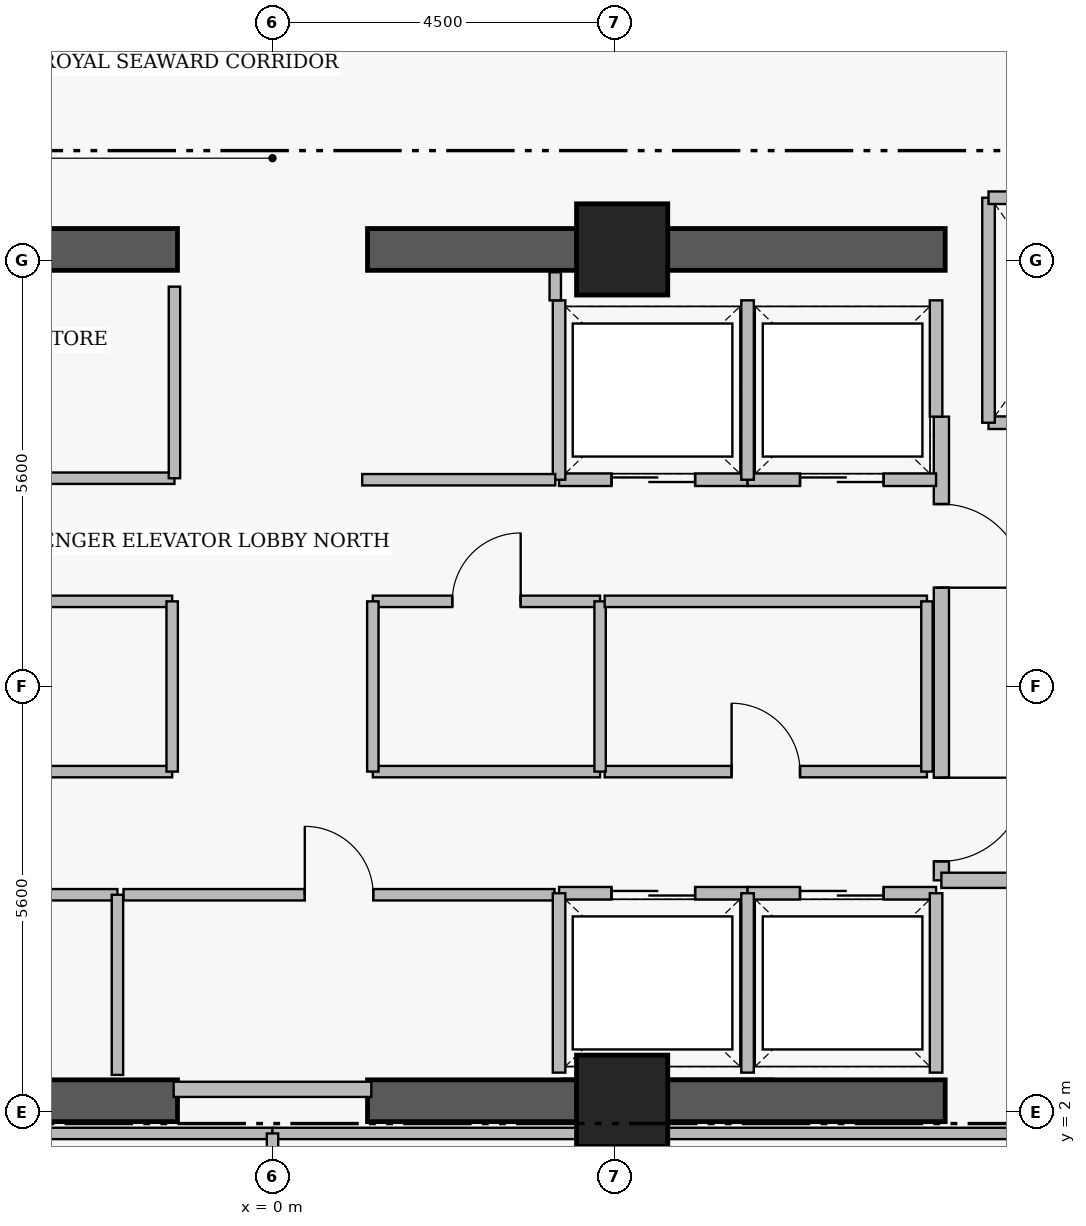
"""IFC4 building model, lengths in metres.
Left out: names, types, materials, properties, quantities, classifications, styles, units other than length and angle.
Written with IfcOpenShell. Run it as: python <this file> out.ifc"""

import sys

from ifc_helpers import new_model, si_unit, direction, frame, frame_2d, origin, origin_2d, place, context, subcontext, project, spatial, rectangle, extrude, element, fill, save


model = new_model("IFC4")
c1 = context("Model", 3, precision=1e-05, world=origin(), true_north=direction((0.0, 1.0)))
c2 = subcontext(c1, "Body", "Model", "MODEL_VIEW")
j1 = project(units=[si_unit("LENGTHUNIT", "METRE"), si_unit("PLANEANGLEUNIT", "RADIAN")], contexts=[c1])
p1 = place(None, origin())
s1 = spatial("IfcSite", under=j1, at=p1, CompositionType="ELEMENT")
p2 = place(p1, origin())
s2 = spatial("IfcBuilding", under=s1, at=p2, CompositionType="ELEMENT")
p3 = place(p2, frame((0.0, 0.0, 261.85)))
s3 = spatial("IfcBuildingStorey", under=s2, at=p3, CompositionType="ELEMENT", Elevation=261.85)
for number, where, z_axis, x_axis in (
    (1, (-8.85, 2.15, 0.0), (0.0, 0.0, 1.0), (1.0, 0.0, 0.0)),
    (2, (1.25, 2.15, 0.0), (0.0, 0.0, 1.0), (1.0, 0.0, 0.0)),
    (3, (-8.85, 13.35, 0.0), (0.0, 0.0, 1.0), (1.0, 0.0, 0.0)),
    (4, (1.25, 13.35, 0.0), (0.0, 0.0, 1.0), (1.0, 0.0, 0.0)),
):
    element("IfcWall", number, at=place(p3, frame(where, z_axis=z_axis, x_axis=x_axis)), inside=s3, PredefinedType="SHEAR", context=c2, shape_type="SweptSolid", body=[
        extrude(rectangle(XDim=7.6, YDim=0.55, at=frame_2d((3.8, 0.0))), origin(), (0.0, 0.0, 1.0), 3.48),
    ])
for number, where, z_axis, x_axis in (
    (5, (4.6, 13.35, 0.0), (0.0, 0.0, 1.0), (1.0, 0.0, 0.0)),
    (6, (4.6, 2.15, 0.0), (0.0, 0.0, 1.0), (1.0, 0.0, 0.0)),
):
    element("IfcColumn", number, at=place(p3, frame(where, z_axis=z_axis, x_axis=x_axis)), inside=s3, PredefinedType="COLUMN", context=c2, shape_type="SweptSolid", body=[
        extrude(rectangle(XDim=1.2, YDim=1.2, at=origin_2d()), origin(), (0.0, 0.0, 1.0), 3.7),
    ])
p4 = place(p3, frame((8.8, 11.15, 0.0), z_axis=(0.0, 0.0, 1.0), x_axis=(0.0, -1.0, 0.0)))
e7 = element("IfcWall", 7, at=p4, inside=s3, PredefinedType="PARTITIONING", context=c2, shape_type="SweptSolid", body=[
    extrude(rectangle(XDim=6.1, YDim=0.2, at=frame_2d((3.05, 0.0))), origin(), (0.0, 0.0, 1.0), 3.48),
])
p5 = place(p4, frame((1.15, 0.0, 0.0)))
e8 = element("IfcOpeningElement", 8, at=p5, cuts=e7, PredefinedType="OPENING", context=c2, shape_type="SweptSolid", body=[
    extrude(rectangle(XDim=1.1, YDim=2.2, at=frame_2d((0.55, 1.1))), frame((0.0, 0.11, 0.0), z_axis=(0.0, -1.0, 0.0), x_axis=(1.0, 0.0, 0.0)), (0.0, 0.0, 1.0), 0.22),
])
p6 = place(p4, frame((4.75, 0.0, 0.0)))
e9 = element("IfcOpeningElement", 9, at=p6, cuts=e7, PredefinedType="OPENING", context=c2, shape_type="SweptSolid", body=[
    extrude(rectangle(XDim=1.1, YDim=2.2, at=frame_2d((0.55, 1.1))), frame((0.0, 0.11, 0.0), z_axis=(0.0, -1.0, 0.0), x_axis=(1.0, 0.0, 0.0)), (0.0, 0.0, 1.0), 0.22),
])
p7 = place(p3, frame((9.42, 11.07, 0.0), z_axis=(0.0, 0.0, 1.0), x_axis=(1.0, 0.0, 0.0)))
e10 = element("IfcWall", 10, at=p7, inside=s3, PredefinedType="PARTITIONING", context=c2, shape_type="SweptSolid", body=[
    extrude(rectangle(XDim=2.16, YDim=0.165, at=frame_2d((1.08, 0.0))), origin(), (0.0, 0.0, 1.0), 3.48),
])
p8 = place(p7, frame((0.53, 0.0, 0.0)))
e11 = element("IfcOpeningElement", 11, at=p8, cuts=e10, PredefinedType="OPENING", context=c2, shape_type="SweptSolid", body=[
    extrude(rectangle(XDim=1.15, YDim=2.25, at=frame_2d((0.575, 1.125))), frame((0.0, 0.093, 0.0), z_axis=(0.0, -1.0, 0.0), x_axis=(1.0, 0.0, 0.0)), (0.0, 0.0, 1.0), 0.185),
])
p9 = place(p3, frame((3.77, 4.88, 0.0), z_axis=(0.0, 0.0, 1.0), x_axis=(1.0, 0.0, 0.0)))
e12 = element("IfcWall", 12, at=p9, inside=s3, PredefinedType="PARTITIONING", context=c2, shape_type="SweptSolid", body=[
    extrude(rectangle(XDim=2.48, YDim=0.165, at=frame_2d((1.24, 0.0))), origin(), (0.0, 0.0, 1.0), 3.48),
])
p10 = place(p9, frame((0.69, 0.0, 0.0)))
e13 = element("IfcOpeningElement", 13, at=p10, cuts=e12, PredefinedType="OPENING", context=c2, shape_type="SweptSolid", body=[
    extrude(rectangle(XDim=1.1, YDim=2.25, at=frame_2d((0.55, 1.125))), frame((0.0, 0.093, 0.0), z_axis=(0.0, -1.0, 0.0), x_axis=(1.0, 0.0, 0.0)), (0.0, 0.0, 1.0), 0.185),
])
p11 = place(p3, frame((6.25, 4.88, 0.0), z_axis=(0.0, 0.0, 1.0), x_axis=(1.0, 0.0, 0.0)))
e14 = element("IfcWall", 14, at=p11, inside=s3, PredefinedType="PARTITIONING", context=c2, shape_type="SweptSolid", body=[
    extrude(rectangle(XDim=2.48, YDim=0.165, at=frame_2d((1.24, 0.0))), origin(), (0.0, 0.0, 1.0), 3.48),
])
p12 = place(p11, frame((0.69, 0.0, 0.0)))
e15 = element("IfcOpeningElement", 15, at=p12, cuts=e14, PredefinedType="OPENING", context=c2, shape_type="SweptSolid", body=[
    extrude(rectangle(XDim=1.1, YDim=2.25, at=frame_2d((0.55, 1.125))), frame((0.0, 0.093, 0.0), z_axis=(0.0, -1.0, 0.0), x_axis=(1.0, 0.0, 0.0)), (0.0, 0.0, 1.0), 0.185),
])
p13 = place(p3, frame((3.77, 10.32, 0.0), z_axis=(0.0, 0.0, 1.0), x_axis=(1.0, 0.0, 0.0)))
e16 = element("IfcWall", 16, at=p13, inside=s3, PredefinedType="PARTITIONING", context=c2, shape_type="SweptSolid", body=[
    extrude(rectangle(XDim=2.48, YDim=0.165, at=frame_2d((1.24, 0.0))), origin(), (0.0, 0.0, 1.0), 3.48),
])
p14 = place(p13, frame((0.69, 0.0, 0.0)))
e17 = element("IfcOpeningElement", 17, at=p14, cuts=e16, PredefinedType="OPENING", context=c2, shape_type="SweptSolid", body=[
    extrude(rectangle(XDim=1.1, YDim=2.25, at=frame_2d((0.55, 1.125))), frame((0.0, 0.093, 0.0), z_axis=(0.0, -1.0, 0.0), x_axis=(1.0, 0.0, 0.0)), (0.0, 0.0, 1.0), 0.185),
])
p15 = place(p3, frame((6.25, 10.32, 0.0), z_axis=(0.0, 0.0, 1.0), x_axis=(1.0, 0.0, 0.0)))
e18 = element("IfcWall", 18, at=p15, inside=s3, PredefinedType="PARTITIONING", context=c2, shape_type="SweptSolid", body=[
    extrude(rectangle(XDim=2.48, YDim=0.165, at=frame_2d((1.24, 0.0))), origin(), (0.0, 0.0, 1.0), 3.48),
])
p16 = place(p15, frame((0.69, 0.0, 0.0)))
e19 = element("IfcOpeningElement", 19, at=p16, cuts=e18, PredefinedType="OPENING", context=c2, shape_type="SweptSolid", body=[
    extrude(rectangle(XDim=1.1, YDim=2.25, at=frame_2d((0.55, 1.125))), frame((0.0, 0.093, 0.0), z_axis=(0.0, -1.0, 0.0), x_axis=(1.0, 0.0, 0.0)), (0.0, 0.0, 1.0), 0.185),
])
p17 = place(p3, frame((-8.71, 4.86, 0.0), z_axis=(0.0, 0.0, 1.0), x_axis=(1.0, 0.0, 0.0)))
e20 = element("IfcWall", 20, at=p17, inside=s3, PredefinedType="PARTITIONING", context=c2, shape_type="SweptSolid", body=[
    extrude(rectangle(XDim=6.67, YDim=0.15, at=frame_2d((3.335, 0.0))), origin(), (0.0, 0.0, 1.0), 3.48),
])
p18 = place(p17, frame((2.885, 0.0, 0.0)))
e21 = element("IfcOpeningElement", 21, at=p18, cuts=e20, PredefinedType="OPENING", context=c2, shape_type="SweptSolid", body=[
    extrude(rectangle(XDim=0.9, YDim=2.15, at=frame_2d((0.45, 1.075))), frame((0.0, 0.085, 0.0), z_axis=(0.0, -1.0, 0.0), x_axis=(1.0, 0.0, 0.0)), (0.0, 0.0, 1.0), 0.17),
])
p19 = place(p3, frame((-1.96, 4.86, 0.0), z_axis=(0.0, 0.0, 1.0), x_axis=(1.0, 0.0, 0.0)))
e22 = element("IfcWall", 22, at=p19, inside=s3, PredefinedType="PARTITIONING", context=c2, shape_type="SweptSolid", body=[
    extrude(rectangle(XDim=5.67, YDim=0.15, at=frame_2d((2.835, 0.0))), origin(), (0.0, 0.0, 1.0), 3.48),
])
p20 = place(p19, frame((2.385, 0.0, 0.0)))
e23 = element("IfcOpeningElement", 23, at=p20, cuts=e22, PredefinedType="OPENING", context=c2, shape_type="SweptSolid", body=[
    extrude(rectangle(XDim=0.9, YDim=2.15, at=frame_2d((0.45, 1.075))), frame((0.0, 0.085, 0.0), z_axis=(0.0, -1.0, 0.0), x_axis=(1.0, 0.0, 0.0)), (0.0, 0.0, 1.0), 0.17),
])
p21 = place(p3, frame((-8.71, 10.34, 0.0), z_axis=(0.0, 0.0, 1.0), x_axis=(1.0, 0.0, 0.0)))
e24 = element("IfcWall", 24, at=p21, inside=s3, PredefinedType="PARTITIONING", context=c2, shape_type="SweptSolid", body=[
    extrude(rectangle(XDim=7.42, YDim=0.15, at=frame_2d((3.71, 0.0))), origin(), (0.0, 0.0, 1.0), 3.48),
])
p22 = place(p21, frame((3.26, 0.0, 0.0)))
e25 = element("IfcOpeningElement", 25, at=p22, cuts=e24, PredefinedType="OPENING", context=c2, shape_type="SweptSolid", body=[
    extrude(rectangle(XDim=0.9, YDim=2.15, at=frame_2d((0.45, 1.075))), frame((0.0, 0.085, 0.0), z_axis=(0.0, -1.0, 0.0), x_axis=(1.0, 0.0, 0.0)), (0.0, 0.0, 1.0), 0.17),
])
p23 = place(p3, frame((-8.61, 6.48, 0.0), z_axis=(0.0, 0.0, 1.0), x_axis=(1.0, 0.0, 0.0)))
e26 = element("IfcWall", 26, at=p23, inside=s3, PredefinedType="PARTITIONING", context=c2, shape_type="SweptSolid", body=[
    extrude(rectangle(XDim=7.29, YDim=0.15, at=frame_2d((3.645, 0.0))), origin(), (0.0, 0.0, 1.0), 3.48),
])
p24 = place(p23, frame((3.195, 0.0, 0.0)))
e27 = element("IfcOpeningElement", 27, at=p24, cuts=e26, PredefinedType="OPENING", context=c2, shape_type="SweptSolid", body=[
    extrude(rectangle(XDim=0.9, YDim=2.15, at=frame_2d((0.45, 1.075))), frame((0.0, 0.085, 0.0), z_axis=(0.0, -1.0, 0.0), x_axis=(1.0, 0.0, 0.0)), (0.0, 0.0, 1.0), 0.17),
])
p25 = place(p3, frame((1.32, 8.72, 0.0), z_axis=(0.0, 0.0, 1.0), x_axis=(1.0, 0.0, 0.0)))
e28 = element("IfcWall", 28, at=p25, inside=s3, PredefinedType="PARTITIONING", context=c2, shape_type="SweptSolid", body=[
    extrude(rectangle(XDim=2.99, YDim=0.15, at=frame_2d((1.495, 0.0))), origin(), (0.0, 0.0, 1.0), 3.48),
])
p26 = place(p25, frame((1.045, 0.0, 0.0)))
e29 = element("IfcOpeningElement", 29, at=p26, cuts=e28, PredefinedType="OPENING", context=c2, shape_type="SweptSolid", body=[
    extrude(rectangle(XDim=0.9, YDim=2.15, at=frame_2d((0.45, 1.075))), frame((0.0, 0.085, 0.0), z_axis=(0.0, -1.0, 0.0), x_axis=(1.0, 0.0, 0.0)), (0.0, 0.0, 1.0), 0.17),
])
p27 = place(p3, frame((4.37, 6.48, 0.0), z_axis=(0.0, 0.0, 1.0), x_axis=(1.0, 0.0, 0.0)))
e30 = element("IfcWall", 30, at=p27, inside=s3, PredefinedType="PARTITIONING", context=c2, shape_type="SweptSolid", body=[
    extrude(rectangle(XDim=4.24, YDim=0.15, at=frame_2d((2.12, 0.0))), origin(), (0.0, 0.0, 1.0), 3.48),
])
p28 = place(p27, frame((1.67, 0.0, 0.0)))
e31 = element("IfcOpeningElement", 31, at=p28, cuts=e30, PredefinedType="OPENING", context=c2, shape_type="SweptSolid", body=[
    extrude(rectangle(XDim=0.9, YDim=2.15, at=frame_2d((0.45, 1.075))), frame((0.0, 0.085, 0.0), z_axis=(0.0, -1.0, 0.0), x_axis=(1.0, 0.0, 0.0)), (0.0, 0.0, 1.0), 0.17),
])
p29 = place(p3, frame((8.8, 5.05, 0.0), z_axis=(0.0, 0.0, 1.0), x_axis=(1.0, 0.0, 0.0)))
e32 = element("IfcWall", 32, at=p29, inside=s3, PredefinedType="PARTITIONING", context=c2, shape_type="SweptSolid", body=[
    extrude(rectangle(XDim=2.85, YDim=0.2, at=frame_2d((1.425, 0.0))), origin(), (0.0, 0.0, 1.0), 3.48),
])
p30 = place(p3, frame((9.42, 11.07, 0.0), z_axis=(0.0, 0.0, 1.0), x_axis=(0.0, 1.0, 0.0)))
e33 = element("IfcWall", 33, at=p30, inside=s3, PredefinedType="PARTITIONING", context=c2, shape_type="SweptSolid", body=[
    extrude(rectangle(XDim=2.96, YDim=0.165, at=frame_2d((1.48, 0.0))), origin(), (0.0, 0.0, 1.0), 3.48),
])
p31 = place(p3, frame((9.42, 14.03, 0.0), z_axis=(0.0, 0.0, 1.0), x_axis=(1.0, 0.0, 0.0)))
e34 = element("IfcWall", 34, at=p31, inside=s3, PredefinedType="PARTITIONING", context=c2, shape_type="SweptSolid", body=[
    extrude(rectangle(XDim=2.16, YDim=0.165, at=frame_2d((1.08, 0.0))), origin(), (0.0, 0.0, 1.0), 3.48),
])
for number, where, z_axis, x_axis in (
    (35, (3.77, 2.52, 0.0), (0.0, 0.0, 1.0), (0.0, 1.0, 0.0)),
    (36, (6.25, 2.52, 0.0), (0.0, 0.0, 1.0), (0.0, 1.0, 0.0)),
    (37, (8.73, 2.52, 0.0), (0.0, 0.0, 1.0), (0.0, 1.0, 0.0)),
    (38, (3.77, 10.32, 0.0), (0.0, 0.0, 1.0), (0.0, 1.0, 0.0)),
    (39, (6.25, 10.32, 0.0), (0.0, 0.0, 1.0), (0.0, 1.0, 0.0)),
):
    element("IfcWall", number, at=place(p3, frame(where, z_axis=z_axis, x_axis=x_axis)), inside=s3, PredefinedType="PARTITIONING", context=c2, shape_type="SweptSolid", body=[
        extrude(rectangle(XDim=2.36, YDim=0.165, at=frame_2d((1.18, 0.0))), origin(), (0.0, 0.0, 1.0), 3.48),
    ])
p32 = place(p3, frame((8.73, 11.15, 0.0), z_axis=(0.0, 0.0, 1.0), x_axis=(0.0, 1.0, 0.0)))
e40 = element("IfcWall", 40, at=p32, inside=s3, PredefinedType="PARTITIONING", context=c2, shape_type="SweptSolid", body=[
    extrude(rectangle(XDim=1.53, YDim=0.165, at=frame_2d((0.765, 0.0))), origin(), (0.0, 0.0, 1.0), 3.48),
])
p33 = place(p3, frame((-1.3, 2.3, 0.0), z_axis=(0.0, 0.0, 1.0), x_axis=(1.0, 0.0, 0.0)))
e41 = element("IfcWall", 41, at=p33, inside=s3, PredefinedType="PARTITIONING", context=c2, shape_type="SweptSolid", body=[
    extrude(rectangle(XDim=2.6, YDim=0.2, at=frame_2d((1.3, 0.0))), origin(), (0.0, 0.0, 1.0), 2.38),
])
p34 = place(p3, frame((-2.04, 2.49, 0.0), z_axis=(0.0, 0.0, 1.0), x_axis=(0.0, 1.0, 0.0)))
e42 = element("IfcWall", 42, at=p34, inside=s3, PredefinedType="PARTITIONING", context=c2, shape_type="SweptSolid", body=[
    extrude(rectangle(XDim=2.37, YDim=0.15, at=frame_2d((1.185, 0.0))), origin(), (0.0, 0.0, 1.0), 3.48),
])
p35 = place(p3, frame((-1.29, 10.34, 0.0), z_axis=(0.0, 0.0, 1.0), x_axis=(0.0, 1.0, 0.0)))
e43 = element("IfcWall", 43, at=p35, inside=s3, PredefinedType="PARTITIONING", context=c2, shape_type="SweptSolid", body=[
    extrude(rectangle(XDim=2.52, YDim=0.15, at=frame_2d((1.26, 0.0))), origin(), (0.0, 0.0, 1.0), 3.48),
])
p36 = place(p3, frame((-8.61, 8.72, 0.0), z_axis=(0.0, 0.0, 1.0), x_axis=(1.0, 0.0, 0.0)))
e44 = element("IfcWall", 44, at=p36, inside=s3, PredefinedType="PARTITIONING", context=c2, shape_type="SweptSolid", body=[
    extrude(rectangle(XDim=7.29, YDim=0.15, at=frame_2d((3.645, 0.0))), origin(), (0.0, 0.0, 1.0), 3.48),
])
p37 = place(p3, frame((-1.32, 6.48, 0.0), z_axis=(0.0, 0.0, 1.0), x_axis=(0.0, 1.0, 0.0)))
e45 = element("IfcWall", 45, at=p37, inside=s3, PredefinedType="PARTITIONING", context=c2, shape_type="SweptSolid", body=[
    extrude(rectangle(XDim=2.24, YDim=0.15, at=frame_2d((1.12, 0.0))), origin(), (0.0, 0.0, 1.0), 3.48),
])
p38 = place(p3, frame((1.32, 6.48, 0.0), z_axis=(0.0, 0.0, 1.0), x_axis=(1.0, 0.0, 0.0)))
e46 = element("IfcWall", 46, at=p38, inside=s3, PredefinedType="PARTITIONING", context=c2, shape_type="SweptSolid", body=[
    extrude(rectangle(XDim=2.99, YDim=0.15, at=frame_2d((1.495, 0.0))), origin(), (0.0, 0.0, 1.0), 3.48),
])
for number, where, z_axis, x_axis in (
    (47, (1.32, 6.48, 0.0), (0.0, 0.0, 1.0), (0.0, 1.0, 0.0)),
    (48, (4.31, 6.48, 0.0), (0.0, 0.0, 1.0), (0.0, 1.0, 0.0)),
):
    element("IfcWall", number, at=place(p3, frame(where, z_axis=z_axis, x_axis=x_axis)), inside=s3, PredefinedType="PARTITIONING", context=c2, shape_type="SweptSolid", body=[
        extrude(rectangle(XDim=2.24, YDim=0.15, at=frame_2d((1.12, 0.0))), origin(), (0.0, 0.0, 1.0), 3.48),
    ])
p39 = place(p3, frame((4.37, 8.72, 0.0), z_axis=(0.0, 0.0, 1.0), x_axis=(1.0, 0.0, 0.0)))
e49 = element("IfcWall", 49, at=p39, inside=s3, PredefinedType="PARTITIONING", context=c2, shape_type="SweptSolid", body=[
    extrude(rectangle(XDim=4.24, YDim=0.15, at=frame_2d((2.12, 0.0))), origin(), (0.0, 0.0, 1.0), 3.48),
])
p40 = place(p3, frame((8.61, 6.48, 0.0), z_axis=(0.0, 0.0, 1.0), x_axis=(0.0, 1.0, 0.0)))
e50 = element("IfcWall", 50, at=p40, inside=s3, PredefinedType="PARTITIONING", context=c2, shape_type="SweptSolid", body=[
    extrude(rectangle(XDim=2.24, YDim=0.15, at=frame_2d((1.12, 0.0))), origin(), (0.0, 0.0, 1.0), 3.48),
])
p41 = place(p3, frame((1.18, 10.32, 0.0), z_axis=(0.0, 0.0, 1.0), x_axis=(1.0, 0.0, 0.0)))
e51 = element("IfcWall", 51, at=p41, inside=s3, PredefinedType="PARTITIONING", context=c2, shape_type="SweptSolid", body=[
    extrude(rectangle(XDim=2.54, YDim=0.15, at=frame_2d((1.27, 0.0))), origin(), (0.0, 0.0, 1.0), 3.48),
])
p42 = place(p3, frame((3.72, 12.68, 0.0), z_axis=(0.0, 0.0, 1.0), x_axis=(0.0, 1.0, 0.0)))
e52 = element("IfcWall", 52, at=p42, inside=s3, PredefinedType="PARTITIONING", context=c2, shape_type="SweptSolid", body=[
    extrude(rectangle(XDim=0.37, YDim=0.15, at=frame_2d((0.185, 0.0))), origin(), (0.0, 0.0, 1.0), 3.48),
])
for number, where, z_axis, x_axis in (
    (53, (-11.68, 1.72, 0.0), (0.0, 0.0, 1.0), (1.0, 0.0, 0.0)),
    (54, (0.0, 1.72, 0.0), (0.0, 0.0, 1.0), (1.0, 0.0, 0.0)),
):
    element("IfcWall", number, at=place(p3, frame(where, z_axis=z_axis, x_axis=x_axis)), inside=s3, PredefinedType="PARTITIONING", context=c2, shape_type="SweptSolid", body=[
        extrude(rectangle(XDim=11.68, YDim=0.15, at=frame_2d((5.84, 0.0))), origin(), (0.0, 0.0, 1.0), 2.38),
    ])
p43 = place(p3, frame((0.0, 0.06, 0.0), z_axis=(0.0, 0.0, 1.0), x_axis=(0.0, 1.0, 0.0)))
e55 = element("IfcWall", 55, at=p43, inside=s3, PredefinedType="PARTITIONING", context=c2, shape_type="SweptSolid", body=[
    extrude(rectangle(XDim=1.66, YDim=0.15, at=frame_2d((0.83, 0.0))), origin(), (0.0, 0.0, 1.0), 3.48),
])
p44 = place(p5, origin())
e56 = element("IfcDoor", 56, at=p44, inside=s3, OperationType="SINGLE_SWING_RIGHT", PredefinedType="DOOR", context=c2, shape_type="SweptSolid", body=[
    extrude(rectangle(XDim=1.1, YDim=2.2, at=frame_2d((0.55, 1.1))), frame((0.0, 0.025, 0.0), z_axis=(0.0, -1.0, 0.0), x_axis=(1.0, 0.0, 0.0)), (0.0, 0.0, 1.0), 0.05),
])
fill(e8, e56)
p45 = place(p6, origin())
e57 = element("IfcDoor", 57, at=p45, inside=s3, OperationType="SINGLE_SWING_LEFT", PredefinedType="DOOR", context=c2, shape_type="SweptSolid", body=[
    extrude(rectangle(XDim=1.1, YDim=2.2, at=frame_2d((0.55, 1.1))), frame((0.0, 0.025, 0.0), z_axis=(0.0, -1.0, 0.0), x_axis=(1.0, 0.0, 0.0)), (0.0, 0.0, 1.0), 0.05),
])
fill(e9, e57)
p46 = place(p10, origin())
e58 = element("IfcDoor", 58, at=p46, inside=s3, OperationType="SLIDING_TO_LEFT", PredefinedType="DOOR", context=c2, shape_type="SweptSolid", body=[
    extrude(rectangle(XDim=1.1, YDim=2.25, at=frame_2d((0.55, 1.125))), frame((0.0, 0.025, 0.0), z_axis=(0.0, -1.0, 0.0), x_axis=(1.0, 0.0, 0.0)), (0.0, 0.0, 1.0), 0.05),
])
fill(e13, e58)
p47 = place(p12, origin())
e59 = element("IfcDoor", 59, at=p47, inside=s3, OperationType="SLIDING_TO_LEFT", PredefinedType="DOOR", context=c2, shape_type="SweptSolid", body=[
    extrude(rectangle(XDim=1.1, YDim=2.25, at=frame_2d((0.55, 1.125))), frame((0.0, 0.025, 0.0), z_axis=(0.0, -1.0, 0.0), x_axis=(1.0, 0.0, 0.0)), (0.0, 0.0, 1.0), 0.05),
])
fill(e15, e59)
p48 = place(p14, origin())
e60 = element("IfcDoor", 60, at=p48, inside=s3, OperationType="SLIDING_TO_LEFT", PredefinedType="DOOR", context=c2, shape_type="SweptSolid", body=[
    extrude(rectangle(XDim=1.1, YDim=2.25, at=frame_2d((0.55, 1.125))), frame((0.0, 0.025, 0.0), z_axis=(0.0, -1.0, 0.0), x_axis=(1.0, 0.0, 0.0)), (0.0, 0.0, 1.0), 0.05),
])
fill(e17, e60)
p49 = place(p16, origin())
e61 = element("IfcDoor", 61, at=p49, inside=s3, OperationType="SLIDING_TO_LEFT", PredefinedType="DOOR", context=c2, shape_type="SweptSolid", body=[
    extrude(rectangle(XDim=1.1, YDim=2.25, at=frame_2d((0.55, 1.125))), frame((0.0, 0.025, 0.0), z_axis=(0.0, -1.0, 0.0), x_axis=(1.0, 0.0, 0.0)), (0.0, 0.0, 1.0), 0.05),
])
fill(e19, e61)
p50 = place(p20, origin())
e62 = element("IfcDoor", 62, at=p50, inside=s3, OperationType="SINGLE_SWING_LEFT", PredefinedType="DOOR", context=c2, shape_type="SweptSolid", body=[
    extrude(rectangle(XDim=0.9, YDim=2.15, at=frame_2d((0.45, 1.075))), frame((0.0, 0.025, 0.0), z_axis=(0.0, -1.0, 0.0), x_axis=(1.0, 0.0, 0.0)), (0.0, 0.0, 1.0), 0.05),
])
fill(e23, e62)
p51 = place(p26, origin())
e63 = element("IfcDoor", 63, at=p51, inside=s3, OperationType="SINGLE_SWING_RIGHT", PredefinedType="DOOR", context=c2, shape_type="SweptSolid", body=[
    extrude(rectangle(XDim=0.9, YDim=2.15, at=frame_2d((0.45, 1.075))), frame((0.0, 0.025, 0.0), z_axis=(0.0, -1.0, 0.0), x_axis=(1.0, 0.0, 0.0)), (0.0, 0.0, 1.0), 0.05),
])
fill(e29, e63)
p52 = place(p28, origin())
e64 = element("IfcDoor", 64, at=p52, inside=s3, OperationType="SINGLE_SWING_LEFT", PredefinedType="DOOR", context=c2, shape_type="SweptSolid", body=[
    extrude(rectangle(XDim=0.9, YDim=2.15, at=frame_2d((0.45, 1.075))), frame((0.0, 0.025, 0.0), z_axis=(0.0, -1.0, 0.0), x_axis=(1.0, 0.0, 0.0)), (0.0, 0.0, 1.0), 0.05),
])
fill(e31, e64)
save(model, sys.argv[1])
